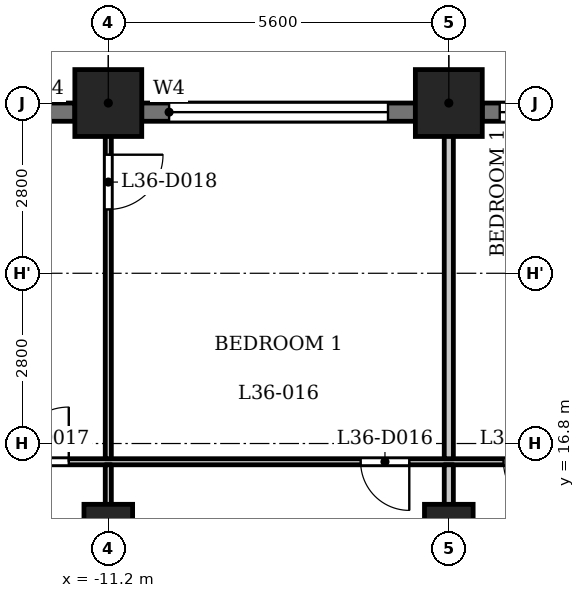
"""IFC4 building model, lengths in metres.
Left out: names, types, materials, properties, quantities, classifications, styles, units other than length and angle.
Written with IfcOpenShell. Run it as: python <this file> out.ifc"""

import sys

from ifc_helpers import new_model, si_unit, direction, frame, frame_2d, origin, origin_2d, place, context, subcontext, project, spatial, rectangle, extrude, element, fill, save


model = new_model("IFC4")
c1 = context("Model", 3, precision=1e-05, world=origin(), true_north=direction((0.0, 1.0)))
c2 = subcontext(c1, "Body", "Model", "MODEL_VIEW")
j1 = project(units=[si_unit("LENGTHUNIT", "METRE"), si_unit("PLANEANGLEUNIT", "RADIAN")], contexts=[c1])
p1 = place(None, origin())
s1 = spatial("IfcSite", under=j1, at=p1, CompositionType="ELEMENT")
p2 = place(p1, origin())
s2 = spatial("IfcBuilding", under=s1, at=p2, CompositionType="ELEMENT")
p3 = place(p2, frame((0.0, 0.0, 143.1)))
s3 = spatial("IfcBuildingStorey", under=s2, at=p3, CompositionType="ELEMENT", Elevation=143.1)
for number, where, z_axis, x_axis in (
    (1, (-5.6, 22.4, 0.0), (0.0, 0.0, 1.0), (1.0, 0.0, 0.0)),
    (2, (-11.2, 22.4, 0.0), (0.0, 0.0, 1.0), (1.0, 0.0, 0.0)),
):
    element("IfcColumn", number, at=place(p3, frame(where, z_axis=z_axis, x_axis=x_axis)), inside=s3, PredefinedType="COLUMN", context=c2, shape_type="SweptSolid", body=[
        extrude(rectangle(XDim=1.1, YDim=1.1, at=origin_2d()), origin(), (0.0, 0.0, 1.0), 3.5),
    ])
for number, where, z_axis, x_axis in (
    (3, (-11.2, 15.4, 0.0), (0.0, 0.0, 1.0), (1.0, 0.0, 0.0)),
    (4, (-5.6, 15.4, 0.0), (0.0, 0.0, 1.0), (1.0, 0.0, 0.0)),
):
    element("IfcColumn", number, at=place(p3, frame(where, z_axis=z_axis, x_axis=x_axis)), inside=s3, PredefinedType="COLUMN", context=c2, shape_type="SweptSolid", body=[
        extrude(rectangle(XDim=0.8, YDim=0.8, at=origin_2d()), origin(), (0.0, 0.0, 1.0), 3.5),
    ])
p4 = place(p3, frame((-0.55, 22.25, 0.0), z_axis=(0.0, 0.0, 1.0), x_axis=(-1.0, 0.0, 0.0)))
e5 = element("IfcWall", 5, at=p4, inside=s3, PredefinedType="SOLIDWALL", context=c2, shape_type="SweptSolid", body=[
    extrude(rectangle(XDim=4.5, YDim=0.3, at=frame_2d((2.25, 0.0))), origin(), (0.0, 0.0, 1.0), 2.45),
])
p5 = place(p4, frame((0.387, 0.0, 0.9)))
e6 = element("IfcOpeningElement", 6, at=p5, cuts=e5, PredefinedType="OPENING", context=c2, shape_type="SweptSolid", body=[
    extrude(rectangle(XDim=1.8, YDim=1.25, at=frame_2d((0.9, 0.625))), frame((0.0, 0.16, 0.0), z_axis=(0.0, -1.0, 0.0), x_axis=(1.0, 0.0, 0.0)), (0.0, 0.0, 1.0), 0.32),
])
p6 = place(p4, frame((3.012, 0.0, 0.6)))
e7 = element("IfcOpeningElement", 7, at=p6, cuts=e5, PredefinedType="OPENING", context=c2, shape_type="SweptSolid", body=[
    extrude(rectangle(XDim=1.2, YDim=1.55, at=frame_2d((0.6, 0.775))), frame((0.0, 0.16, 0.0), z_axis=(0.0, -1.0, 0.0), x_axis=(1.0, 0.0, 0.0)), (0.0, 0.0, 1.0), 0.32),
])
p7 = place(p3, frame((-6.15, 22.25, 0.0), z_axis=(0.0, 0.0, 1.0), x_axis=(-1.0, 0.0, 0.0)))
e8 = element("IfcWall", 8, at=p7, inside=s3, PredefinedType="SOLIDWALL", context=c2, shape_type="SweptSolid", body=[
    extrude(rectangle(XDim=4.5, YDim=0.3, at=frame_2d((2.25, 0.0))), origin(), (0.0, 0.0, 1.0), 2.45),
])
p8 = place(p7, frame((0.45, 0.0, 1.2)))
e9 = element("IfcOpeningElement", 9, at=p8, cuts=e8, PredefinedType="OPENING", context=c2, shape_type="SweptSolid", body=[
    extrude(rectangle(XDim=3.6, YDim=0.95, at=frame_2d((1.8, 0.475))), frame((0.0, 0.16, 0.0), z_axis=(0.0, -1.0, 0.0), x_axis=(1.0, 0.0, 0.0)), (0.0, 0.0, 1.0), 0.32),
])
p9 = place(p3, frame((-11.75, 22.25, 0.0), z_axis=(0.0, 0.0, 1.0), x_axis=(-1.0, 0.0, 0.0)))
e10 = element("IfcWall", 10, at=p9, inside=s3, PredefinedType="SOLIDWALL", context=c2, shape_type="SweptSolid", body=[
    extrude(rectangle(XDim=4.5, YDim=0.3, at=frame_2d((2.25, 0.0))), origin(), (0.0, 0.0, 1.0), 2.45),
])
p10 = place(p9, frame((0.45, 0.0, 1.2)))
e11 = element("IfcOpeningElement", 11, at=p10, cuts=e10, PredefinedType="OPENING", context=c2, shape_type="SweptSolid", body=[
    extrude(rectangle(XDim=3.6, YDim=0.95, at=frame_2d((1.8, 0.475))), frame((0.0, 0.16, 0.0), z_axis=(0.0, -1.0, 0.0), x_axis=(1.0, 0.0, 0.0)), (0.0, 0.0, 1.0), 0.32),
])
p11 = place(p3, frame((-16.725, 16.5, 0.0), z_axis=(0.0, 0.0, 1.0), x_axis=(1.0, 0.0, 0.0)))
e12 = element("IfcWall", 12, at=p11, inside=s3, PredefinedType="PARTITIONING", context=c2, shape_type="SweptSolid", body=[
    extrude(rectangle(XDim=33.45, YDim=0.1, at=frame_2d((16.725, 0.0))), origin(), (0.0, 0.0, 1.0), 3.2),
])
p12 = place(p11, frame((9.675, 0.0, 0.0)))
e13 = element("IfcOpeningElement", 13, at=p12, cuts=e12, PredefinedType="OPENING", context=c2, shape_type="SweptSolid", body=[
    extrude(rectangle(XDim=0.8, YDim=2.1, at=frame_2d((0.4, 1.05))), frame((0.0, 0.06, 0.0), z_axis=(0.0, -1.0, 0.0), x_axis=(1.0, 0.0, 0.0)), (0.0, 0.0, 1.0), 0.12),
])
p13 = place(p11, frame((3.975, 0.0, 0.0)))
e14 = element("IfcOpeningElement", 14, at=p13, cuts=e12, PredefinedType="OPENING", context=c2, shape_type="SweptSolid", body=[
    extrude(rectangle(XDim=0.9, YDim=2.1, at=frame_2d((0.45, 1.05))), frame((0.0, 0.06, 0.0), z_axis=(0.0, -1.0, 0.0), x_axis=(1.0, 0.0, 0.0)), (0.0, 0.0, 1.0), 0.12),
])
p14 = place(p11, frame((12.025, 0.0, 0.0)))
e15 = element("IfcOpeningElement", 15, at=p14, cuts=e12, PredefinedType="OPENING", context=c2, shape_type="SweptSolid", body=[
    extrude(rectangle(XDim=0.8, YDim=2.1, at=frame_2d((0.4, 1.05))), frame((0.0, 0.06, 0.0), z_axis=(0.0, -1.0, 0.0), x_axis=(1.0, 0.0, 0.0)), (0.0, 0.0, 1.0), 0.12),
])
p15 = place(p11, frame((15.175, 0.0, 0.0)))
e16 = element("IfcOpeningElement", 16, at=p15, cuts=e12, PredefinedType="OPENING", context=c2, shape_type="SweptSolid", body=[
    extrude(rectangle(XDim=0.9, YDim=2.1, at=frame_2d((0.45, 1.05))), frame((0.0, 0.06, 0.0), z_axis=(0.0, -1.0, 0.0), x_axis=(1.0, 0.0, 0.0)), (0.0, 0.0, 1.0), 0.12),
])
p16 = place(p11, frame((20.975, 0.0, 0.0)))
e17 = element("IfcOpeningElement", 17, at=p16, cuts=e12, PredefinedType="OPENING", context=c2, shape_type="SweptSolid", body=[
    extrude(rectangle(XDim=0.8, YDim=2.1, at=frame_2d((0.4, 1.05))), frame((0.0, 0.06, 0.0), z_axis=(0.0, -1.0, 0.0), x_axis=(1.0, 0.0, 0.0)), (0.0, 0.0, 1.0), 0.12),
])
p17 = place(p11, frame((18.175, 0.0, 0.0)))
e18 = element("IfcOpeningElement", 18, at=p17, cuts=e12, PredefinedType="OPENING", context=c2, shape_type="SweptSolid", body=[
    extrude(rectangle(XDim=0.9, YDim=2.1, at=frame_2d((0.45, 1.05))), frame((0.0, 0.06, 0.0), z_axis=(0.0, -1.0, 0.0), x_axis=(1.0, 0.0, 0.0)), (0.0, 0.0, 1.0), 0.12),
])
p18 = place(p11, frame((23.725, 0.0, 0.0)))
e19 = element("IfcOpeningElement", 19, at=p18, cuts=e12, PredefinedType="OPENING", context=c2, shape_type="SweptSolid", body=[
    extrude(rectangle(XDim=0.8, YDim=2.1, at=frame_2d((0.4, 1.05))), frame((0.0, 0.06, 0.0), z_axis=(0.0, -1.0, 0.0), x_axis=(1.0, 0.0, 0.0)), (0.0, 0.0, 1.0), 0.12),
])
p19 = place(p11, frame((26.125, 0.0, 0.0)))
e20 = element("IfcOpeningElement", 20, at=p19, cuts=e12, PredefinedType="OPENING", context=c2, shape_type="SweptSolid", body=[
    extrude(rectangle(XDim=0.9, YDim=2.1, at=frame_2d((0.45, 1.05))), frame((0.0, 0.06, 0.0), z_axis=(0.0, -1.0, 0.0), x_axis=(1.0, 0.0, 0.0)), (0.0, 0.0, 1.0), 0.12),
])
p20 = place(p11, frame((32.125, 0.0, 0.0)))
e21 = element("IfcOpeningElement", 21, at=p20, cuts=e12, PredefinedType="OPENING", context=c2, shape_type="SweptSolid", body=[
    extrude(rectangle(XDim=0.8, YDim=2.1, at=frame_2d((0.4, 1.05))), frame((0.0, 0.06, 0.0), z_axis=(0.0, -1.0, 0.0), x_axis=(1.0, 0.0, 0.0)), (0.0, 0.0, 1.0), 0.12),
])
p21 = place(p11, frame((28.975, 0.0, 0.0)))
e22 = element("IfcOpeningElement", 22, at=p21, cuts=e12, PredefinedType="OPENING", context=c2, shape_type="SweptSolid", body=[
    extrude(rectangle(XDim=0.9, YDim=2.1, at=frame_2d((0.45, 1.05))), frame((0.0, 0.06, 0.0), z_axis=(0.0, -1.0, 0.0), x_axis=(1.0, 0.0, 0.0)), (0.0, 0.0, 1.0), 0.12),
])
p22 = place(p3, frame((-11.2, 13.275, 0.0), z_axis=(0.0, 0.0, 1.0), x_axis=(0.0, 1.0, 0.0)))
e23 = element("IfcWall", 23, at=p22, inside=s3, PredefinedType="PARTITIONING", context=c2, shape_type="SweptSolid", body=[
    extrude(rectangle(XDim=3.175, YDim=0.1, at=frame_2d((1.587, 0.0))), origin(), (0.0, 0.0, 1.0), 3.2),
])
p23 = place(p3, frame((-11.2, 16.55, 0.0), z_axis=(0.0, 0.0, 1.0), x_axis=(0.0, 1.0, 0.0)))
e24 = element("IfcWall", 24, at=p23, inside=s3, PredefinedType="PARTITIONING", context=c2, shape_type="SweptSolid", body=[
    extrude(rectangle(XDim=6.38, YDim=0.1, at=frame_2d((3.19, 0.0))), origin(), (0.0, 0.0, 1.0), 3.2),
])
p24 = place(p23, frame((4.1, 0.0, 0.0)))
e25 = element("IfcOpeningElement", 25, at=p24, cuts=e24, PredefinedType="OPENING", context=c2, shape_type="SweptSolid", body=[
    extrude(rectangle(XDim=0.9, YDim=2.1, at=frame_2d((0.45, 1.05))), frame((0.0, 0.06, 0.0), z_axis=(0.0, -1.0, 0.0), x_axis=(1.0, 0.0, 0.0)), (0.0, 0.0, 1.0), 0.12),
])
p25 = place(p3, frame((-5.6, 13.275, 0.0), z_axis=(0.0, 0.0, 1.0), x_axis=(0.0, 1.0, 0.0)))
e26 = element("IfcWall", 26, at=p25, inside=s3, PredefinedType="PARTITIONING", context=c2, shape_type="SweptSolid", body=[
    extrude(rectangle(XDim=3.175, YDim=0.15, at=frame_2d((1.587, 0.0))), origin(), (0.0, 0.0, 1.0), 3.2),
])
p26 = place(p3, frame((-5.6, 16.55, 0.0), z_axis=(0.0, 0.0, 1.0), x_axis=(0.0, 1.0, 0.0)))
e27 = element("IfcWall", 27, at=p26, inside=s3, PredefinedType="PARTITIONING", context=c2, shape_type="SweptSolid", body=[
    extrude(rectangle(XDim=6.38, YDim=0.15, at=frame_2d((3.19, 0.0))), origin(), (0.0, 0.0, 1.0), 3.2),
])
p27 = place(p12, origin())
e28 = element("IfcDoor", 28, at=p27, inside=s3, OperationType="SINGLE_SWING_RIGHT", PredefinedType="DOOR", context=c2, shape_type="SweptSolid", body=[
    extrude(rectangle(XDim=0.8, YDim=2.1, at=frame_2d((0.4, 1.05))), frame((0.0, 0.025, 0.0), z_axis=(0.0, -1.0, 0.0), x_axis=(1.0, 0.0, 0.0)), (0.0, 0.0, 1.0), 0.05),
])
fill(e13, e28)
p28 = place(p13, origin())
e29 = element("IfcDoor", 29, at=p28, inside=s3, OperationType="SINGLE_SWING_LEFT", PredefinedType="DOOR", context=c2, shape_type="SweptSolid", body=[
    extrude(rectangle(XDim=0.9, YDim=2.1, at=frame_2d((0.45, 1.05))), frame((0.0, 0.025, 0.0), z_axis=(0.0, -1.0, 0.0), x_axis=(1.0, 0.0, 0.0)), (0.0, 0.0, 1.0), 0.05),
])
fill(e14, e29)
p29 = place(p24, origin())
e30 = element("IfcDoor", 30, at=p29, inside=s3, OperationType="SINGLE_SWING_RIGHT", PredefinedType="DOOR", context=c2, shape_type="SweptSolid", body=[
    extrude(rectangle(XDim=0.9, YDim=2.1, at=frame_2d((0.45, 1.05))), frame((0.0, 0.025, 0.0), z_axis=(0.0, -1.0, 0.0), x_axis=(1.0, 0.0, 0.0)), (0.0, 0.0, 1.0), 0.05),
])
fill(e25, e30)
p30 = place(p14, origin())
e31 = element("IfcDoor", 31, at=p30, inside=s3, OperationType="SINGLE_SWING_RIGHT", PredefinedType="DOOR", context=c2, shape_type="SweptSolid", body=[
    extrude(rectangle(XDim=0.8, YDim=2.1, at=frame_2d((0.4, 1.05))), frame((0.0, 0.025, 0.0), z_axis=(0.0, -1.0, 0.0), x_axis=(1.0, 0.0, 0.0)), (0.0, 0.0, 1.0), 0.05),
])
fill(e15, e31)
p31 = place(p6, origin())
e32 = element("IfcWindow", 32, at=p31, inside=s3, PartitioningType="SINGLE_PANEL", PredefinedType="WINDOW", context=c2, shape_type="SweptSolid", body=[
    extrude(rectangle(XDim=1.2, YDim=1.55, at=frame_2d((0.6, 0.775))), frame((0.0, 0.03, 0.0), z_axis=(0.0, -1.0, 0.0), x_axis=(1.0, 0.0, 0.0)), (0.0, 0.0, 1.0), 0.06),
])
fill(e7, e32)
p32 = place(p8, origin())
e33 = element("IfcWindow", 33, at=p32, inside=s3, PartitioningType="SINGLE_PANEL", PredefinedType="WINDOW", context=c2, shape_type="SweptSolid", body=[
    extrude(rectangle(XDim=3.6, YDim=0.95, at=frame_2d((1.8, 0.475))), frame((0.0, 0.03, 0.0), z_axis=(0.0, -1.0, 0.0), x_axis=(1.0, 0.0, 0.0)), (0.0, 0.0, 1.0), 0.06),
])
fill(e9, e33)
save(model, sys.argv[1])
